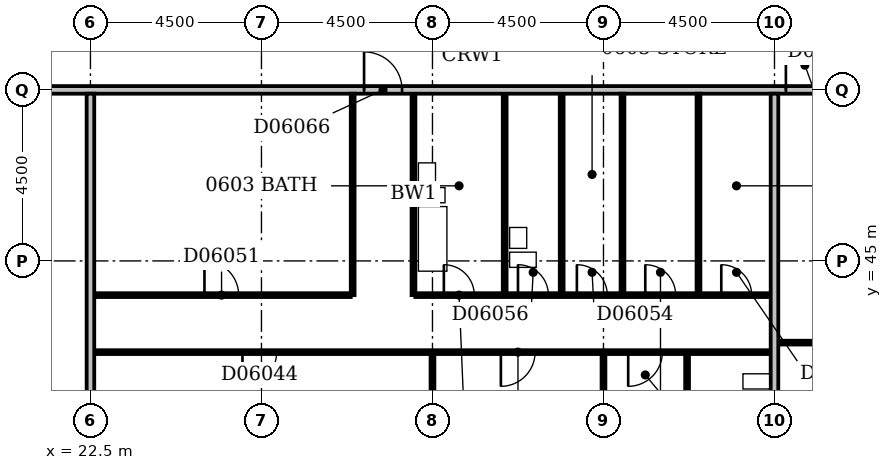
"""IFC4 building model, lengths in metres.
Left out: names, types, materials, properties, quantities, classifications, styles, units other than length and angle.
Written with IfcOpenShell. Run it as: python <this file> out.ifc"""

import sys

from ifc_helpers import new_model, si_unit, direction, frame, frame_2d, origin, place, context, subcontext, project, spatial, rectangle, extrude, element, fill, save


model = new_model("IFC4")
c1 = context("Model", 3, precision=1e-05, world=origin(), true_north=direction((0.0, 1.0)))
c2 = subcontext(c1, "Body", "Model", "MODEL_VIEW")
j1 = project(units=[si_unit("LENGTHUNIT", "METRE"), si_unit("PLANEANGLEUNIT", "RADIAN")], contexts=[c1])
p1 = place(None, origin())
s1 = spatial("IfcSite", under=j1, at=p1, CompositionType="ELEMENT")
p2 = place(p1, origin())
s2 = spatial("IfcBuilding", under=s1, at=p2, CompositionType="ELEMENT")
p3 = place(p2, frame((0.0, 0.0, 32.6)))
s3 = spatial("IfcBuildingStorey", under=s2, at=p3, CompositionType="ELEMENT", Elevation=32.6)
p4 = place(p3, frame((22.5, 36.6, 0.0), z_axis=(0.0, 0.0, 1.0), x_axis=(0.0, 1.0, 0.0)))
e1 = element("IfcWall", 1, at=p4, inside=s3, PredefinedType="PARTITIONING", context=c2, shape_type="SweptSolid", body=[
    extrude(rectangle(XDim=12.8, YDim=0.2, at=frame_2d((6.4, 0.0))), origin(), (0.0, 0.0, 1.0), 3.3),
])
p5 = place(p3, frame((31.5, 36.6, 0.0), z_axis=(0.0, 0.0, 1.0), x_axis=(0.0, 1.0, 0.0)))
e2 = element("IfcWall", 2, at=p5, inside=s3, PredefinedType="PARTITIONING", context=c2, shape_type="SweptSolid", body=[
    extrude(rectangle(XDim=5.95, YDim=0.1, at=frame_2d((2.975, 0.0))), origin(), (0.0, 0.0, 1.0), 3.3),
])
p6 = place(p3, frame((36.0, 36.6, 0.0), z_axis=(0.0, 0.0, 1.0), x_axis=(0.0, 1.0, 0.0)))
e3 = element("IfcWall", 3, at=p6, inside=s3, PredefinedType="PARTITIONING", context=c2, shape_type="SweptSolid", body=[
    extrude(rectangle(XDim=5.95, YDim=0.1, at=frame_2d((2.975, 0.0))), origin(), (0.0, 0.0, 1.0), 2.4),
])
p7 = place(p3, frame((40.5, 36.6, 0.0), z_axis=(0.0, 0.0, 1.0), x_axis=(0.0, 1.0, 0.0)))
e4 = element("IfcWall", 4, at=p7, inside=s3, PredefinedType="PARTITIONING", context=c2, shape_type="SweptSolid", body=[
    extrude(rectangle(XDim=12.8, YDim=0.2, at=frame_2d((6.4, 0.0))), origin(), (0.0, 0.0, 1.0), 3.3),
])
p8 = place(p3, frame((38.2, 39.7, 0.0), z_axis=(0.0, 0.0, 1.0), x_axis=(0.0, 1.0, 0.0)))
e5 = element("IfcWall", 5, at=p8, inside=s3, PredefinedType="PLUMBINGWALL", context=c2, shape_type="SweptSolid", body=[
    extrude(rectangle(XDim=2.85, YDim=0.1, at=frame_2d((1.425, 0.0))), origin(), (0.0, 0.0, 1.0), 3.3),
])
p9 = place(p8, frame((1.05, 0.0, 0.0)))
e6 = element("IfcOpeningElement", 6, at=p9, cuts=e5, PredefinedType="OPENING", context=c2, shape_type="SweptSolid", body=[
    extrude(rectangle(XDim=0.8, YDim=2.1, at=frame_2d((0.4, 1.05))), frame((0.0, 0.062, 0.0), z_axis=(0.0, -1.0, 0.0), x_axis=(1.0, 0.0, 0.0)), (0.0, 0.0, 1.0), 0.124),
])
p10 = place(p3, frame((22.6, 42.6, 0.0), z_axis=(0.0, 0.0, 1.0), x_axis=(1.0, 0.0, 0.0)))
e7 = element("IfcWall", 7, at=p10, inside=s3, PredefinedType="PARTITIONING", context=c2, shape_type="SweptSolid", body=[
    extrude(rectangle(XDim=17.8, YDim=0.1, at=frame_2d((8.9, 0.0))), origin(), (0.0, 0.0, 1.0), 3.3),
])
p11 = place(p10, frame((3.9, 0.0, 0.0)))
e8 = element("IfcOpeningElement", 8, at=p11, cuts=e7, PredefinedType="OPENING", context=c2, shape_type="SweptSolid", body=[
    extrude(rectangle(XDim=0.9, YDim=2.1, at=frame_2d((0.45, 1.05))), frame((0.0, 0.062, 0.0), z_axis=(0.0, -1.0, 0.0), x_axis=(1.0, 0.0, 0.0)), (0.0, 0.0, 1.0), 0.124),
])
p12 = place(p10, frame((10.7, 0.0, 0.0)))
e9 = element("IfcOpeningElement", 9, at=p12, cuts=e7, PredefinedType="OPENING", context=c2, shape_type="SweptSolid", body=[
    extrude(rectangle(XDim=0.9, YDim=2.1, at=frame_2d((0.45, 1.05))), frame((0.0, 0.062, 0.0), z_axis=(0.0, -1.0, 0.0), x_axis=(1.0, 0.0, 0.0)), (0.0, 0.0, 1.0), 0.124),
])
p13 = place(p10, frame((14.05, 0.0, 0.0)))
e10 = element("IfcOpeningElement", 10, at=p13, cuts=e7, PredefinedType="OPENING", context=c2, shape_type="SweptSolid", body=[
    extrude(rectangle(XDim=0.9, YDim=2.1, at=frame_2d((0.45, 1.05))), frame((0.0, 0.062, 0.0), z_axis=(0.0, -1.0, 0.0), x_axis=(1.0, 0.0, 0.0)), (0.0, 0.0, 1.0), 0.124),
])
p14 = place(p3, frame((40.6, 42.85, 0.0), z_axis=(0.0, 0.0, 1.0), x_axis=(1.0, 0.0, 0.0)))
e11 = element("IfcWall", 11, at=p14, inside=s3, PredefinedType="PARTITIONING", context=c2, shape_type="SweptSolid", body=[
    extrude(rectangle(XDim=13.3, YDim=0.1, at=frame_2d((6.65, 0.0))), origin(), (0.0, 0.0, 1.0), 3.3),
])
p15 = place(p14, frame((3.9, 0.0, 0.0)))
e12 = element("IfcOpeningElement", 12, at=p15, cuts=e11, PredefinedType="OPENING", context=c2, shape_type="SweptSolid", body=[
    extrude(rectangle(XDim=0.9, YDim=2.1, at=frame_2d((0.45, 1.05))), frame((0.0, 0.062, 0.0), z_axis=(0.0, -1.0, 0.0), x_axis=(1.0, 0.0, 0.0)), (0.0, 0.0, 1.0), 0.124),
])
p16 = place(p14, frame((10.7, 0.0, 0.0)))
e13 = element("IfcOpeningElement", 13, at=p16, cuts=e11, PredefinedType="OPENING", context=c2, shape_type="SweptSolid", body=[
    extrude(rectangle(XDim=0.9, YDim=2.1, at=frame_2d((0.45, 1.05))), frame((0.0, 0.062, 0.0), z_axis=(0.0, -1.0, 0.0), x_axis=(1.0, 0.0, 0.0)), (0.0, 0.0, 1.0), 0.124),
])
p17 = place(p3, frame((22.6, 44.1, 0.0), z_axis=(0.0, 0.0, 1.0), x_axis=(1.0, 0.0, 0.0)))
e14 = element("IfcWall", 14, at=p17, inside=s3, PredefinedType="PARTITIONING", context=c2, shape_type="SweptSolid", body=[
    extrude(rectangle(XDim=6.75, YDim=0.1, at=frame_2d((3.375, 0.0))), origin(), (0.0, 0.0, 1.0), 3.3),
])
p18 = place(p17, frame((2.9, 0.0, 0.0)))
e15 = element("IfcOpeningElement", 15, at=p18, cuts=e14, PredefinedType="OPENING", context=c2, shape_type="SweptSolid", body=[
    extrude(rectangle(XDim=0.9, YDim=2.1, at=frame_2d((0.45, 1.05))), frame((0.0, 0.062, 0.0), z_axis=(0.0, -1.0, 0.0), x_axis=(1.0, 0.0, 0.0)), (0.0, 0.0, 1.0), 0.124),
])
p19 = place(p3, frame((29.4, 44.1, 0.0), z_axis=(0.0, 0.0, 1.0), x_axis=(0.0, 1.0, 0.0)))
e16 = element("IfcWall", 16, at=p19, inside=s3, PredefinedType="PARTITIONING", context=c2, shape_type="SweptSolid", body=[
    extrude(rectangle(XDim=5.3, YDim=0.1, at=frame_2d((2.65, 0.0))), origin(), (0.0, 0.0, 1.0), 3.3),
])
p20 = place(p3, frame((31.0, 44.1, 0.0), z_axis=(0.0, 0.0, 1.0), x_axis=(0.0, 1.0, 0.0)))
e17 = element("IfcWall", 17, at=p20, inside=s3, PredefinedType="PLUMBINGWALL", context=c2, shape_type="SweptSolid", body=[
    extrude(rectangle(XDim=5.3, YDim=0.1, at=frame_2d((2.65, 0.0))), origin(), (0.0, 0.0, 1.0), 3.3),
])
p21 = place(p3, frame((31.05, 44.1, 0.0), z_axis=(0.0, 0.0, 1.0), x_axis=(1.0, 0.0, 0.0)))
e18 = element("IfcWall", 18, at=p21, inside=s3, PredefinedType="PARTITIONING", context=c2, shape_type="SweptSolid", body=[
    extrude(rectangle(XDim=9.35, YDim=0.1, at=frame_2d((4.675, 0.0))), origin(), (0.0, 0.0, 1.0), 3.3),
])
p22 = place(p21, frame((0.75, 0.0, 0.0)))
e19 = element("IfcOpeningElement", 19, at=p22, cuts=e18, PredefinedType="OPENING", context=c2, shape_type="SweptSolid", body=[
    extrude(rectangle(XDim=0.8, YDim=2.1, at=frame_2d((0.4, 1.05))), frame((0.0, 0.062, 0.0), z_axis=(0.0, -1.0, 0.0), x_axis=(1.0, 0.0, 0.0)), (0.0, 0.0, 1.0), 0.124),
])
p23 = place(p21, frame((8.05, 0.0, 0.0)))
e20 = element("IfcOpeningElement", 20, at=p23, cuts=e18, PredefinedType="OPENING", context=c2, shape_type="SweptSolid", body=[
    extrude(rectangle(XDim=0.8, YDim=2.1, at=frame_2d((0.4, 1.05))), frame((0.0, 0.062, 0.0), z_axis=(0.0, -1.0, 0.0), x_axis=(1.0, 0.0, 0.0)), (0.0, 0.0, 1.0), 0.124),
])
p24 = place(p21, frame((4.25, 0.0, 0.0)))
e21 = element("IfcOpeningElement", 21, at=p24, cuts=e18, PredefinedType="OPENING", context=c2, shape_type="SweptSolid", body=[
    extrude(rectangle(XDim=0.8, YDim=2.1, at=frame_2d((0.4, 1.05))), frame((0.0, 0.062, 0.0), z_axis=(0.0, -1.0, 0.0), x_axis=(1.0, 0.0, 0.0)), (0.0, 0.0, 1.0), 0.124),
])
p25 = place(p21, frame((6.05, 0.0, 0.0)))
e22 = element("IfcOpeningElement", 22, at=p25, cuts=e18, PredefinedType="OPENING", context=c2, shape_type="SweptSolid", body=[
    extrude(rectangle(XDim=0.8, YDim=2.1, at=frame_2d((0.4, 1.05))), frame((0.0, 0.062, 0.0), z_axis=(0.0, -1.0, 0.0), x_axis=(1.0, 0.0, 0.0)), (0.0, 0.0, 1.0), 0.124),
])
p26 = place(p21, frame((2.7, 0.0, 0.0)))
e23 = element("IfcOpeningElement", 23, at=p26, cuts=e18, PredefinedType="OPENING", context=c2, shape_type="SweptSolid", body=[
    extrude(rectangle(XDim=0.8, YDim=2.1, at=frame_2d((0.4, 1.05))), frame((0.0, 0.062, 0.0), z_axis=(0.0, -1.0, 0.0), x_axis=(1.0, 0.0, 0.0)), (0.0, 0.0, 1.0), 0.124),
])
for number, where, z_axis, x_axis in (
    (24, (33.4, 44.15, 0.0), (0.0, 0.0, 1.0), (0.0, 1.0, 0.0)),
    (25, (34.9, 44.15, 0.0), (0.0, 0.0, 1.0), (0.0, 1.0, 0.0)),
):
    element("IfcWall", number, at=place(p3, frame(where, z_axis=z_axis, x_axis=x_axis)), inside=s3, PredefinedType="PLUMBINGWALL", context=c2, shape_type="SweptSolid", body=[
        extrude(rectangle(XDim=5.25, YDim=0.1, at=frame_2d((2.625, 0.0))), origin(), (0.0, 0.0, 1.0), 3.3),
    ])
p27 = place(p3, frame((36.5, 44.15, 0.0), z_axis=(0.0, 0.0, 1.0), x_axis=(0.0, 1.0, 0.0)))
e26 = element("IfcWall", 26, at=p27, inside=s3, PredefinedType="PARTITIONING", context=c2, shape_type="SweptSolid", body=[
    extrude(rectangle(XDim=5.25, YDim=0.1, at=frame_2d((2.625, 0.0))), origin(), (0.0, 0.0, 1.0), 2.4),
])
p28 = place(p3, frame((38.5, 44.15, 0.0), z_axis=(0.0, 0.0, 1.0), x_axis=(0.0, 1.0, 0.0)))
e27 = element("IfcWall", 27, at=p28, inside=s3, PredefinedType="PARTITIONING", context=c2, shape_type="SweptSolid", body=[
    extrude(rectangle(XDim=5.25, YDim=0.1, at=frame_2d((2.625, 0.0))), origin(), (0.0, 0.0, 1.0), 3.3),
])
p29 = place(p3, frame((9.1, 49.5, 0.0), z_axis=(0.0, 0.0, 1.0), x_axis=(1.0, 0.0, 0.0)))
e28 = element("IfcWall", 28, at=p29, inside=s3, PredefinedType="PARTITIONING", context=c2, shape_type="SweptSolid", body=[
    extrude(rectangle(XDim=57.8, YDim=0.2, at=frame_2d((28.9, 0.0))), origin(), (0.0, 0.0, 1.0), 3.3),
])
p30 = place(p29, frame((20.6, 0.0, 0.0)))
e29 = element("IfcOpeningElement", 29, at=p30, cuts=e28, PredefinedType="OPENING", context=c2, shape_type="SweptSolid", body=[
    extrude(rectangle(XDim=1.0, YDim=2.1, at=frame_2d((0.5, 1.05))), frame((0.0, 0.112, 0.0), z_axis=(0.0, -1.0, 0.0), x_axis=(1.0, 0.0, 0.0)), (0.0, 0.0, 1.0), 0.224),
])
p31 = place(p29, frame((31.7, 0.0, 0.0)))
e30 = element("IfcOpeningElement", 30, at=p31, cuts=e28, PredefinedType="OPENING", context=c2, shape_type="SweptSolid", body=[
    extrude(rectangle(XDim=1.0, YDim=2.1, at=frame_2d((0.5, 1.05))), frame((0.0, 0.112, 0.0), z_axis=(0.0, -1.0, 0.0), x_axis=(1.0, 0.0, 0.0)), (0.0, 0.0, 1.0), 0.224),
])
p32 = place(p29, frame((47.6, 0.0, 0.0)))
e31 = element("IfcOpeningElement", 31, at=p32, cuts=e28, PredefinedType="OPENING", context=c2, shape_type="SweptSolid", body=[
    extrude(rectangle(XDim=1.0, YDim=2.1, at=frame_2d((0.5, 1.05))), frame((0.0, 0.112, 0.0), z_axis=(0.0, -1.0, 0.0), x_axis=(1.0, 0.0, 0.0)), (0.0, 0.0, 1.0), 0.224),
])
p33 = place(p29, frame((54.15, 0.0, 0.0)))
e32 = element("IfcOpeningElement", 32, at=p33, cuts=e28, PredefinedType="OPENING", context=c2, shape_type="SweptSolid", body=[
    extrude(rectangle(XDim=1.0, YDim=2.1, at=frame_2d((0.5, 1.05))), frame((0.0, 0.112, 0.0), z_axis=(0.0, -1.0, 0.0), x_axis=(1.0, 0.0, 0.0)), (0.0, 0.0, 1.0), 0.224),
])
p34 = place(p29, frame((10.65, 0.0, 0.0)))
e33 = element("IfcOpeningElement", 33, at=p34, cuts=e28, PredefinedType="OPENING", context=c2, shape_type="SweptSolid", body=[
    extrude(rectangle(XDim=0.9, YDim=2.1, at=frame_2d((0.45, 1.05))), frame((0.0, 0.112, 0.0), z_axis=(0.0, -1.0, 0.0), x_axis=(1.0, 0.0, 0.0)), (0.0, 0.0, 1.0), 0.224),
])
p35 = place(p11, frame((0.9, 0.0, 0.0), z_axis=(0.0, 0.0, 1.0), x_axis=(-1.0, 0.0, 0.0)))
e34 = element("IfcDoor", 34, at=p35, inside=s3, OperationType="SINGLE_SWING_RIGHT", PredefinedType="DOOR", context=c2, shape_type="SweptSolid", body=[
    extrude(rectangle(XDim=0.9, YDim=2.1, at=frame_2d((0.45, 1.05))), frame((0.0, 0.025, 0.0), z_axis=(0.0, -1.0, 0.0), x_axis=(1.0, 0.0, 0.0)), (0.0, 0.0, 1.0), 0.05),
])
fill(e8, e34)
p36 = place(p12, frame((0.9, 0.0, 0.0), z_axis=(0.0, 0.0, 1.0), x_axis=(-1.0, 0.0, 0.0)))
e35 = element("IfcDoor", 35, at=p36, inside=s3, OperationType="SINGLE_SWING_RIGHT", PredefinedType="DOOR", context=c2, shape_type="SweptSolid", body=[
    extrude(rectangle(XDim=0.9, YDim=2.1, at=frame_2d((0.45, 1.05))), frame((0.0, 0.025, 0.0), z_axis=(0.0, -1.0, 0.0), x_axis=(1.0, 0.0, 0.0)), (0.0, 0.0, 1.0), 0.05),
])
fill(e9, e35)
p37 = place(p13, frame((0.9, 0.0, 0.0), z_axis=(0.0, 0.0, 1.0), x_axis=(-1.0, 0.0, 0.0)))
e36 = element("IfcDoor", 36, at=p37, inside=s3, OperationType="SINGLE_SWING_RIGHT", PredefinedType="DOOR", context=c2, shape_type="SweptSolid", body=[
    extrude(rectangle(XDim=0.9, YDim=2.1, at=frame_2d((0.45, 1.05))), frame((0.0, 0.025, 0.0), z_axis=(0.0, -1.0, 0.0), x_axis=(1.0, 0.0, 0.0)), (0.0, 0.0, 1.0), 0.05),
])
fill(e10, e36)
p38 = place(p18, origin())
e37 = element("IfcDoor", 37, at=p38, inside=s3, OperationType="SINGLE_SWING_LEFT", PredefinedType="DOOR", context=c2, shape_type="SweptSolid", body=[
    extrude(rectangle(XDim=0.9, YDim=2.1, at=frame_2d((0.45, 1.05))), frame((0.0, 0.025, 0.0), z_axis=(0.0, -1.0, 0.0), x_axis=(1.0, 0.0, 0.0)), (0.0, 0.0, 1.0), 0.05),
])
fill(e15, e37)
p39 = place(p22, origin())
e38 = element("IfcDoor", 38, at=p39, inside=s3, OperationType="SINGLE_SWING_LEFT", PredefinedType="DOOR", context=c2, shape_type="SweptSolid", body=[
    extrude(rectangle(XDim=0.8, YDim=2.1, at=frame_2d((0.4, 1.05))), frame((0.0, 0.025, 0.0), z_axis=(0.0, -1.0, 0.0), x_axis=(1.0, 0.0, 0.0)), (0.0, 0.0, 1.0), 0.05),
])
fill(e19, e38)
p40 = place(p23, origin())
e39 = element("IfcDoor", 39, at=p40, inside=s3, OperationType="SINGLE_SWING_LEFT", PredefinedType="DOOR", context=c2, shape_type="SweptSolid", body=[
    extrude(rectangle(XDim=0.8, YDim=2.1, at=frame_2d((0.4, 1.05))), frame((0.0, 0.025, 0.0), z_axis=(0.0, -1.0, 0.0), x_axis=(1.0, 0.0, 0.0)), (0.0, 0.0, 1.0), 0.05),
])
fill(e20, e39)
p41 = place(p24, origin())
e40 = element("IfcDoor", 40, at=p41, inside=s3, OperationType="SINGLE_SWING_LEFT", PredefinedType="DOOR", context=c2, shape_type="SweptSolid", body=[
    extrude(rectangle(XDim=0.8, YDim=2.1, at=frame_2d((0.4, 1.05))), frame((0.0, 0.025, 0.0), z_axis=(0.0, -1.0, 0.0), x_axis=(1.0, 0.0, 0.0)), (0.0, 0.0, 1.0), 0.05),
])
fill(e21, e40)
p42 = place(p25, origin())
e41 = element("IfcDoor", 41, at=p42, inside=s3, OperationType="SINGLE_SWING_LEFT", PredefinedType="DOOR", context=c2, shape_type="SweptSolid", body=[
    extrude(rectangle(XDim=0.8, YDim=2.1, at=frame_2d((0.4, 1.05))), frame((0.0, 0.025, 0.0), z_axis=(0.0, -1.0, 0.0), x_axis=(1.0, 0.0, 0.0)), (0.0, 0.0, 1.0), 0.05),
])
fill(e22, e41)
p43 = place(p26, origin())
e42 = element("IfcDoor", 42, at=p43, inside=s3, OperationType="SINGLE_SWING_LEFT", PredefinedType="DOOR", context=c2, shape_type="SweptSolid", body=[
    extrude(rectangle(XDim=0.8, YDim=2.1, at=frame_2d((0.4, 1.05))), frame((0.0, 0.025, 0.0), z_axis=(0.0, -1.0, 0.0), x_axis=(1.0, 0.0, 0.0)), (0.0, 0.0, 1.0), 0.05),
])
fill(e23, e42)
p44 = place(p30, origin())
e43 = element("IfcDoor", 43, at=p44, inside=s3, OperationType="SINGLE_SWING_LEFT", PredefinedType="DOOR", context=c2, shape_type="SweptSolid", body=[
    extrude(rectangle(XDim=1.0, YDim=2.1, at=frame_2d((0.5, 1.05))), frame((0.0, 0.025, 0.0), z_axis=(0.0, -1.0, 0.0), x_axis=(1.0, 0.0, 0.0)), (0.0, 0.0, 1.0), 0.05),
])
fill(e29, e43)
p45 = place(p31, origin())
e44 = element("IfcDoor", 44, at=p45, inside=s3, OperationType="SINGLE_SWING_LEFT", PredefinedType="DOOR", context=c2, shape_type="SweptSolid", body=[
    extrude(rectangle(XDim=1.0, YDim=2.1, at=frame_2d((0.5, 1.05))), frame((0.0, 0.025, 0.0), z_axis=(0.0, -1.0, 0.0), x_axis=(1.0, 0.0, 0.0)), (0.0, 0.0, 1.0), 0.05),
])
fill(e30, e44)
save(model, sys.argv[1])
